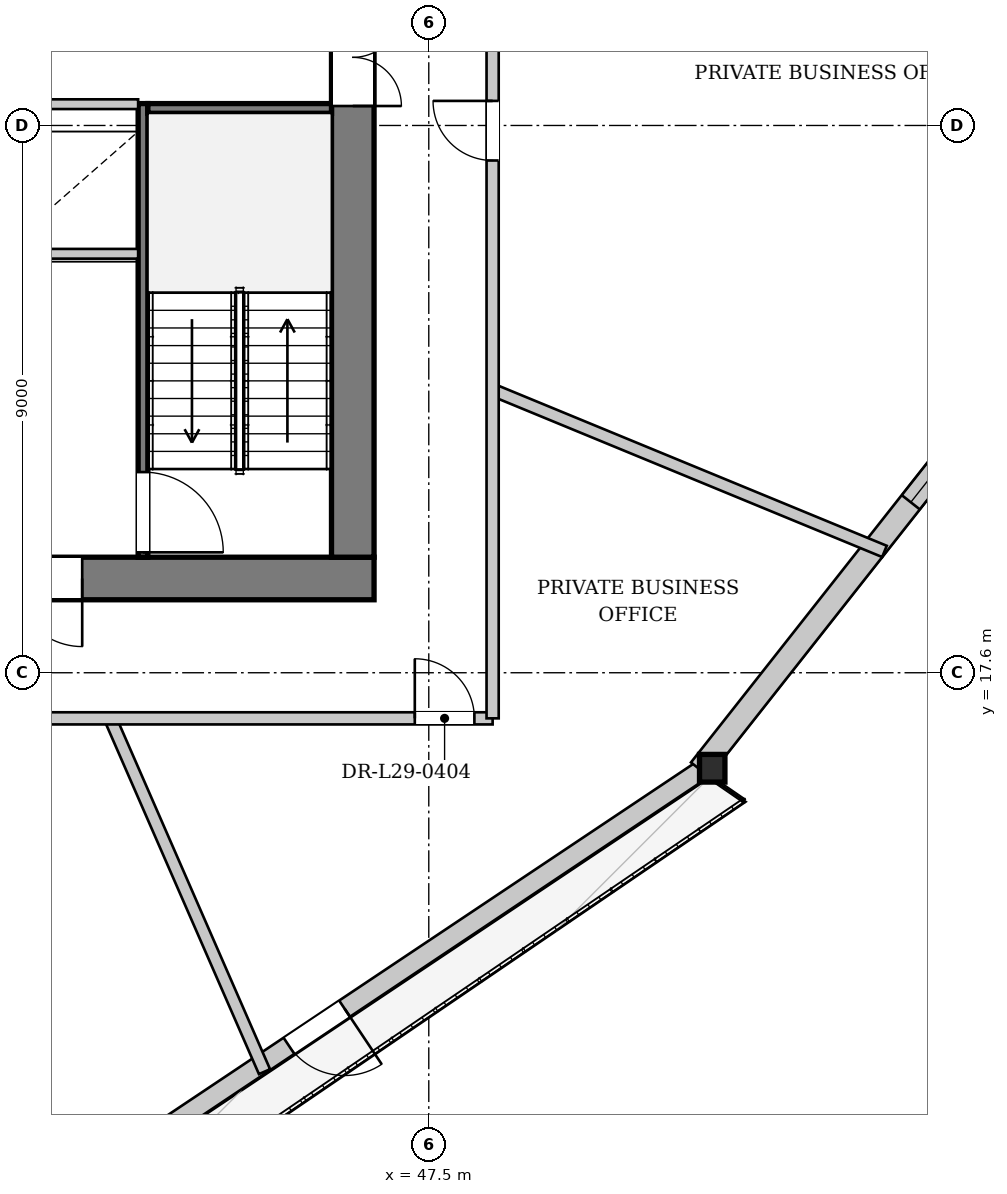
"""IFC4 building model, lengths in metres.
Left out: names, types, materials, properties, quantities, classifications, styles, units other than length and angle.
Written with IfcOpenShell. Run it as: python <this file> out.ifc"""

import sys

from ifc_helpers import new_model, si_unit, direction, frame, frame_2d, origin, origin_2d, place, context, subcontext, project, spatial, rectangle, i_section, extrude, source, transform, mapped, element, fill, save


model = new_model("IFC4")
c1 = context("Model", 3, precision=1e-05, world=origin(), true_north=direction((0.0, 1.0)))
c2 = subcontext(c1, "Body", "Model", "MODEL_VIEW")
j1 = project(units=[si_unit("LENGTHUNIT", "METRE"), si_unit("PLANEANGLEUNIT", "RADIAN")], contexts=[c1])
p1 = place(None, origin())
s1 = spatial("IfcSite", under=j1, at=p1, CompositionType="ELEMENT")
p2 = place(p1, origin())
s2 = spatial("IfcBuilding", under=s1, at=p2, CompositionType="ELEMENT")
p3 = place(p2, frame((0.0, 0.0, 112.8)))
s3 = spatial("IfcBuildingStorey", under=s2, at=p3, CompositionType="ELEMENT", Elevation=112.8)
m1 = source(origin(), c2, "Body", "SweptSolid", [
    extrude(i_section(OverallWidth=0.418, OverallDepth=0.455, WebThickness=0.038, FlangeThickness=0.059, at=origin_2d()), origin(), (0.0, 0.0, 1.0), 3.398),
])
p4 = place(p3, frame((52.111, 15.89, 0.0), z_axis=(0.029960418259, 0.082193569518, 0.996165945246), x_axis=(-0.939529379003, 0.34246831385, 0.0)))
e1 = element("IfcColumn", 1, at=p4, inside=s3, PredefinedType="COLUMN", context=c2, shape_type="MappedRepresentation", body=[
    mapped(m1, transform((0.0, 0.0, 0.0), x_axis=(1.0, 0.0, 0.0), y_axis=(0.0, 1.0, 0.0), z_axis=(0.0, 0.0, 1.0), scale=1.0)),
])
p5 = place(p3, frame((52.022, 16.023, 0.0), z_axis=(0.0, 0.0, 1.0), x_axis=(-0.831442115586, -0.55561138256, 0.0)))
e2 = element("IfcWall", 2, at=p5, inside=s3, PredefinedType="SOLIDWALL", context=c2, shape_type="SweptSolid", body=[
    extrude(rectangle(XDim=23.92, YDim=0.32, at=frame_2d((11.96, 0.0))), origin(), (0.0, 0.0, 1.0), 2.692),
])
p6 = place(p5, frame((7.104, 0.0, 0.0)))
e3 = element("IfcOpeningElement", 3, at=p6, cuts=e2, PredefinedType="OPENING", context=c2, shape_type="SweptSolid", body=[
    extrude(rectangle(XDim=1.1, YDim=2.3, at=frame_2d((0.55, 1.15))), frame((0.0, 0.17, 0.0), z_axis=(0.0, -1.0, 0.0), x_axis=(1.0, 0.0, 0.0)), (0.0, 0.0, 1.0), 0.34),
])
p7 = place(p5, frame((16.801, 0.0, 0.372)))
e4 = element("IfcOpeningElement", 4, at=p7, cuts=e2, PredefinedType="OPENING", context=c2, shape_type="SweptSolid", body=[
    extrude(rectangle(XDim=1.8, YDim=2.2, at=frame_2d((0.9, 1.1))), frame((0.0, 0.17, 0.0), z_axis=(0.0, -1.0, 0.0), x_axis=(1.0, 0.0, 0.0)), (0.0, 0.0, 1.0), 0.34),
])
p8 = place(p3, frame((66.771, 34.791, 0.0), z_axis=(0.0, 0.0, 1.0), x_axis=(-0.619144125254, -0.785277372757, 0.0)))
e5 = element("IfcWall", 5, at=p8, inside=s3, PredefinedType="SOLIDWALL", context=c2, shape_type="SweptSolid", body=[
    extrude(rectangle(XDim=23.92, YDim=0.38, at=frame_2d((11.96, 0.0))), origin(), (0.0, 0.0, 1.0), 2.692),
])
p9 = place(p8, frame((5.598, 0.0, 0.322)))
e6 = element("IfcOpeningElement", 6, at=p9, cuts=e5, PredefinedType="OPENING", context=c2, shape_type="SweptSolid", body=[
    extrude(rectangle(XDim=2.2, YDim=2.25, at=frame_2d((1.1, 1.125))), frame((0.0, 0.2, 0.0), z_axis=(0.0, -1.0, 0.0), x_axis=(1.0, 0.0, 0.0)), (0.0, 0.0, 1.0), 0.4),
])
p10 = place(p8, frame((16.122, 0.0, 0.322)))
e7 = element("IfcOpeningElement", 7, at=p10, cuts=e5, PredefinedType="OPENING", context=c2, shape_type="SweptSolid", body=[
    extrude(rectangle(XDim=2.2, YDim=2.25, at=frame_2d((1.1, 1.125))), frame((0.0, 0.2, 0.0), z_axis=(0.0, -1.0, 0.0), x_axis=(1.0, 0.0, 0.0)), (0.0, 0.0, 1.0), 0.4),
])
p11 = place(p3, frame((46.6, 19.15, 0.0), z_axis=(0.0, 0.0, 1.0), x_axis=(-1.0, 0.0, 0.0)))
e8 = element("IfcWall", 8, at=p11, inside=s3, PredefinedType="SHEAR", context=c2, shape_type="SweptSolid", body=[
    extrude(rectangle(XDim=17.2, YDim=0.7, at=frame_2d((8.6, 0.0))), origin(), (0.0, 0.0, 1.0), 3.3),
])
p12 = place(p11, frame((4.8, 0.0, 0.0)))
e9 = element("IfcOpeningElement", 9, at=p12, cuts=e8, PredefinedType="OPENING", context=c2, shape_type="SweptSolid", body=[
    extrude(rectangle(XDim=1.12, YDim=2.25, at=frame_2d((0.56, 1.125))), frame((0.0, 0.36, 0.0), z_axis=(0.0, -1.0, 0.0), x_axis=(1.0, 0.0, 0.0)), (0.0, 0.0, 1.0), 0.72),
])
p13 = place(p11, frame((11.3, 0.0, 0.0)))
e10 = element("IfcOpeningElement", 10, at=p13, cuts=e8, PredefinedType="OPENING", context=c2, shape_type="SweptSolid", body=[
    extrude(rectangle(XDim=1.12, YDim=2.25, at=frame_2d((0.56, 1.125))), frame((0.0, 0.36, 0.0), z_axis=(0.0, -1.0, 0.0), x_axis=(1.0, 0.0, 0.0)), (0.0, 0.0, 1.0), 0.72),
])
p14 = place(p3, frame((46.25, 33.7, 0.0), z_axis=(0.0, 0.0, 1.0), x_axis=(0.0, -1.0, 0.0)))
e11 = element("IfcWall", 11, at=p14, inside=s3, PredefinedType="SHEAR", context=c2, shape_type="SweptSolid", body=[
    extrude(rectangle(XDim=14.2, YDim=0.7, at=frame_2d((7.1, 0.0))), origin(), (0.0, 0.0, 1.0), 3.3),
])
p15 = place(p14, frame((5.18, 0.0, 0.0)))
e12 = element("IfcOpeningElement", 12, at=p15, cuts=e11, PredefinedType="OPENING", context=c2, shape_type="SweptSolid", body=[
    extrude(rectangle(XDim=1.6, YDim=2.2, at=frame_2d((0.8, 1.1))), frame((0.0, 0.36, 0.0), z_axis=(0.0, -1.0, 0.0), x_axis=(1.0, 0.0, 0.0)), (0.0, 0.0, 1.0), 0.72),
])
p16 = place(p3, frame((42.8, 26.96, 0.0), z_axis=(0.0, 0.0, 1.0), x_axis=(0.0, -1.0, 0.0)))
e13 = element("IfcWall", 13, at=p16, inside=s3, PredefinedType="PARTITIONING", context=c2, shape_type="SweptSolid", body=[
    extrude(rectangle(XDim=7.46, YDim=0.16, at=frame_2d((3.73, 0.0))), origin(), (0.0, 0.0, 1.0), 3.3),
])
p17 = place(p16, frame((6.06, 0.0, 0.0)))
e14 = element("IfcOpeningElement", 14, at=p17, cuts=e13, PredefinedType="OPENING", context=c2, shape_type="SweptSolid", body=[
    extrude(rectangle(XDim=1.32, YDim=2.2, at=frame_2d((0.66, 1.1))), frame((0.0, 0.09, 0.0), z_axis=(0.0, -1.0, 0.0), x_axis=(1.0, 0.0, 0.0)), (0.0, 0.0, 1.0), 0.18),
])
p18 = place(p3, frame((42.88, 26.88, 0.0), z_axis=(0.0, 0.0, 1.0), x_axis=(1.0, 0.0, 0.0)))
e15 = element("IfcWall", 15, at=p18, inside=s3, PredefinedType="PARTITIONING", context=c2, shape_type="SweptSolid", body=[
    extrude(rectangle(XDim=3.02, YDim=0.16, at=frame_2d((1.51, 0.0))), origin(), (0.0, 0.0, 1.0), 3.3),
])
p19 = place(p3, frame((33.28, 24.49, 0.0), z_axis=(0.0, 0.0, 1.0), x_axis=(1.0, 0.0, 0.0)))
e16 = element("IfcWall", 16, at=p19, inside=s3, PredefinedType="PARTITIONING", context=c2, shape_type="SweptSolid", body=[
    extrude(rectangle(XDim=9.44, YDim=0.16, at=frame_2d((4.72, 0.0))), origin(), (0.0, 0.0, 1.0), 3.3),
])
p20 = place(p3, frame((33.28, 26.95, 0.0), z_axis=(0.0, 0.0, 1.0), x_axis=(1.0, 0.0, 0.0)))
e17 = element("IfcWall", 17, at=p20, inside=s3, PredefinedType="PARTITIONING", context=c2, shape_type="SweptSolid", body=[
    extrude(rectangle(XDim=9.44, YDim=0.16, at=frame_2d((4.72, 0.0))), origin(), (0.0, 0.0, 1.0), 3.3),
])
p21 = place(p20, frame((0.26, 0.0, 0.0)))
e18 = element("IfcOpeningElement", 18, at=p21, cuts=e17, PredefinedType="OPENING", context=c2, shape_type="SweptSolid", body=[
    extrude(rectangle(XDim=1.1, YDim=2.2, at=frame_2d((0.55, 1.1))), frame((0.0, 0.09, 0.0), z_axis=(0.0, -1.0, 0.0), x_axis=(1.0, 0.0, 0.0)), (0.0, 0.0, 1.0), 0.18),
])
p22 = place(p20, frame((2.01, 0.0, 0.0)))
e19 = element("IfcOpeningElement", 19, at=p22, cuts=e17, PredefinedType="OPENING", context=c2, shape_type="SweptSolid", body=[
    extrude(rectangle(XDim=1.1, YDim=2.2, at=frame_2d((0.55, 1.1))), frame((0.0, 0.09, 0.0), z_axis=(0.0, -1.0, 0.0), x_axis=(1.0, 0.0, 0.0)), (0.0, 0.0, 1.0), 0.18),
])
p23 = place(p20, frame((3.76, 0.0, 0.0)))
e20 = element("IfcOpeningElement", 20, at=p23, cuts=e17, PredefinedType="OPENING", context=c2, shape_type="SweptSolid", body=[
    extrude(rectangle(XDim=1.1, YDim=2.2, at=frame_2d((0.55, 1.1))), frame((0.0, 0.09, 0.0), z_axis=(0.0, -1.0, 0.0), x_axis=(1.0, 0.0, 0.0)), (0.0, 0.0, 1.0), 0.18),
])
p24 = place(p20, frame((5.51, 0.0, 0.0)))
e21 = element("IfcOpeningElement", 21, at=p24, cuts=e17, PredefinedType="OPENING", context=c2, shape_type="SweptSolid", body=[
    extrude(rectangle(XDim=1.1, YDim=2.2, at=frame_2d((0.55, 1.1))), frame((0.0, 0.09, 0.0), z_axis=(0.0, -1.0, 0.0), x_axis=(1.0, 0.0, 0.0)), (0.0, 0.0, 1.0), 0.18),
])
p25 = place(p3, frame((42.26, 16.85, 0.0), z_axis=(0.0, 0.0, 1.0), x_axis=(0.400317853683, -0.916376350646, 0.0)))
e22 = element("IfcWall", 22, at=p25, inside=s3, PredefinedType="PARTITIONING", context=c2, shape_type="SweptSolid", body=[
    extrude(rectangle(XDim=6.341, YDim=0.2, at=frame_2d((3.17, 0.0))), origin(), (0.0, 0.0, 1.0), 3.3),
])
p26 = place(p3, frame((48.55, 22.252, 0.0), z_axis=(0.0, 0.0, 1.0), x_axis=(0.924536579634, -0.381093312613, 0.0)))
e23 = element("IfcWall", 23, at=p26, inside=s3, PredefinedType="PARTITIONING", context=c2, shape_type="SweptSolid", body=[
    extrude(rectangle(XDim=6.97, YDim=0.2, at=frame_2d((3.485, 0.0))), origin(), (0.0, 0.0, 1.0), 3.3),
])
p27 = place(p3, frame((27.45, 16.85, 0.0), z_axis=(0.0, 0.0, 1.0), x_axis=(1.0, 0.0, 0.0)))
e24 = element("IfcWall", 24, at=p27, inside=s3, PredefinedType="PARTITIONING", context=c2, shape_type="SweptSolid", body=[
    extrude(rectangle(XDim=21.1, YDim=0.2, at=frame_2d((10.55, 0.0))), origin(), (0.0, 0.0, 1.0), 2.985),
])
p28 = place(p27, frame((7.933, 0.0, 0.0)))
e25 = element("IfcOpeningElement", 25, at=p28, cuts=e24, PredefinedType="OPENING", context=c2, shape_type="SweptSolid", body=[
    extrude(rectangle(XDim=0.98, YDim=2.15, at=frame_2d((0.49, 1.075))), frame((0.0, 0.11, 0.0), z_axis=(0.0, -1.0, 0.0), x_axis=(1.0, 0.0, 0.0)), (0.0, 0.0, 1.0), 0.22),
])
p29 = place(p27, frame((19.82, 0.0, 0.0)))
e26 = element("IfcOpeningElement", 26, at=p29, cuts=e24, PredefinedType="OPENING", context=c2, shape_type="SweptSolid", body=[
    extrude(rectangle(XDim=0.98, YDim=2.15, at=frame_2d((0.49, 1.075))), frame((0.0, 0.11, 0.0), z_axis=(0.0, -1.0, 0.0), x_axis=(1.0, 0.0, 0.0)), (0.0, 0.0, 1.0), 0.22),
])
p30 = place(p27, frame((0.3, 0.0, 0.0)))
e27 = element("IfcOpeningElement", 27, at=p30, cuts=e24, PredefinedType="OPENING", context=c2, shape_type="SweptSolid", body=[
    extrude(rectangle(XDim=0.98, YDim=2.15, at=frame_2d((0.49, 1.075))), frame((0.0, 0.11, 0.0), z_axis=(0.0, -1.0, 0.0), x_axis=(1.0, 0.0, 0.0)), (0.0, 0.0, 1.0), 0.22),
])
p31 = place(p3, frame((48.55, 16.85, 0.0), z_axis=(0.0, 0.0, 1.0), x_axis=(0.0, 1.0, 0.0)))
e28 = element("IfcWall", 28, at=p31, inside=s3, PredefinedType="PARTITIONING", context=c2, shape_type="SweptSolid", body=[
    extrude(rectangle(XDim=19.5, YDim=0.2, at=frame_2d((9.75, 0.0))), origin(), (0.0, 0.0, 1.0), 3.3),
])
p32 = place(p31, frame((9.174, 0.0, 0.0)))
e29 = element("IfcOpeningElement", 29, at=p32, cuts=e28, PredefinedType="OPENING", context=c2, shape_type="SweptSolid", body=[
    extrude(rectangle(XDim=0.98, YDim=2.15, at=frame_2d((0.49, 1.075))), frame((0.0, 0.11, 0.0), z_axis=(0.0, -1.0, 0.0), x_axis=(1.0, 0.0, 0.0)), (0.0, 0.0, 1.0), 0.22),
])
m2 = source(origin(), c2, "Body", "SweptSolid", [
    extrude(rectangle(XDim=1.1, YDim=2.3, at=frame_2d((0.55, 1.15))), frame((0.0, 0.025, 0.0), z_axis=(0.0, -1.0, 0.0), x_axis=(1.0, 0.0, 0.0)), (0.0, 0.0, 1.0), 0.05),
])
p33 = place(p6, origin())
e30 = element("IfcDoor", 30, at=p33, inside=s3, OperationType="SINGLE_SWING_LEFT", PredefinedType="DOOR", context=c2, shape_type="MappedRepresentation", body=[
    mapped(m2, transform((0.0, 0.0, 0.0), x_axis=(1.0, 0.0, 0.0), y_axis=(0.0, 1.0, 0.0), z_axis=(0.0, 0.0, 1.0), scale=1.0)),
])
fill(e3, e30)
m3 = source(origin(), c2, "Body", "SweptSolid", [
    extrude(rectangle(XDim=2.2, YDim=2.25, at=frame_2d((1.1, 1.125))), frame((0.0, 0.03, 0.0), z_axis=(0.0, -1.0, 0.0), x_axis=(1.0, 0.0, 0.0)), (0.0, 0.0, 1.0), 0.06),
])
p34 = place(p10, origin())
e31 = element("IfcWindow", 31, at=p34, inside=s3, PartitioningType="SINGLE_PANEL", PredefinedType="WINDOW", context=c2, shape_type="MappedRepresentation", body=[
    mapped(m3, transform((0.0, 0.0, 0.0), x_axis=(1.0, 0.0, 0.0), y_axis=(0.0, 1.0, 0.0), z_axis=(0.0, 0.0, 1.0), scale=1.0)),
])
fill(e7, e31)
m4 = source(origin(), c2, "Body", "SweptSolid", [
    extrude(rectangle(XDim=1.12, YDim=2.25, at=frame_2d((0.56, 1.125))), frame((0.0, 0.025, 0.0), z_axis=(0.0, -1.0, 0.0), x_axis=(1.0, 0.0, 0.0)), (0.0, 0.0, 1.0), 0.05),
])
p35 = place(p12, origin())
e32 = element("IfcDoor", 32, at=p35, inside=s3, OperationType="SINGLE_SWING_LEFT", PredefinedType="DOOR", context=c2, shape_type="MappedRepresentation", body=[
    mapped(m4, transform((0.0, 0.0, 0.0), x_axis=(1.0, 0.0, 0.0), y_axis=(0.0, 1.0, 0.0), z_axis=(0.0, 0.0, 1.0), scale=1.0)),
])
fill(e9, e32)
m5 = source(origin(), c2, "Body", "SweptSolid", [
    extrude(rectangle(XDim=1.6, YDim=2.2, at=frame_2d((0.8, 1.1))), frame((0.0, 0.025, 0.0), z_axis=(0.0, -1.0, 0.0), x_axis=(1.0, 0.0, 0.0)), (0.0, 0.0, 1.0), 0.05),
])
p36 = place(p15, origin())
e33 = element("IfcDoor", 33, at=p36, inside=s3, OperationType="DOUBLE_DOOR_SINGLE_SWING", PredefinedType="DOOR", context=c2, shape_type="MappedRepresentation", body=[
    mapped(m5, transform((0.0, 0.0, 0.0), x_axis=(1.0, 0.0, 0.0), y_axis=(0.0, 1.0, 0.0), z_axis=(0.0, 0.0, 1.0), scale=1.0)),
])
fill(e12, e33)
m6 = source(origin(), c2, "Body", "SweptSolid", [
    extrude(rectangle(XDim=1.32, YDim=2.2, at=frame_2d((0.66, 1.1))), frame((0.0, 0.025, 0.0), z_axis=(0.0, -1.0, 0.0), x_axis=(1.0, 0.0, 0.0)), (0.0, 0.0, 1.0), 0.05),
])
p37 = place(p17, origin())
e34 = element("IfcDoor", 34, at=p37, inside=s3, OperationType="SINGLE_SWING_RIGHT", PredefinedType="DOOR", context=c2, shape_type="MappedRepresentation", body=[
    mapped(m6, transform((0.0, 0.0, 0.0), x_axis=(1.0, 0.0, 0.0), y_axis=(0.0, 1.0, 0.0), z_axis=(0.0, 0.0, 1.0), scale=1.0)),
])
fill(e14, e34)
m7 = source(origin(), c2, "Body", "SweptSolid", [
    extrude(rectangle(XDim=0.98, YDim=2.15, at=frame_2d((0.49, 1.075))), frame((0.0, 0.025, 0.0), z_axis=(0.0, -1.0, 0.0), x_axis=(1.0, 0.0, 0.0)), (0.0, 0.0, 1.0), 0.05),
])
p38 = place(p29, origin())
e35 = element("IfcDoor", 35, at=p38, inside=s3, OperationType="SINGLE_SWING_LEFT", PredefinedType="DOOR", context=c2, shape_type="MappedRepresentation", body=[
    mapped(m7, transform((0.0, 0.0, 0.0), x_axis=(1.0, 0.0, 0.0), y_axis=(0.0, 1.0, 0.0), z_axis=(0.0, 0.0, 1.0), scale=1.0)),
])
fill(e26, e35)
p39 = place(p32, origin())
e36 = element("IfcDoor", 36, at=p39, inside=s3, OperationType="SINGLE_SWING_RIGHT", PredefinedType="DOOR", context=c2, shape_type="MappedRepresentation", body=[
    mapped(m7, transform((0.0, 0.0, 0.0), x_axis=(1.0, 0.0, 0.0), y_axis=(0.0, 1.0, 0.0), z_axis=(0.0, 0.0, 1.0), scale=1.0)),
])
fill(e29, e36)
save(model, sys.argv[1])
